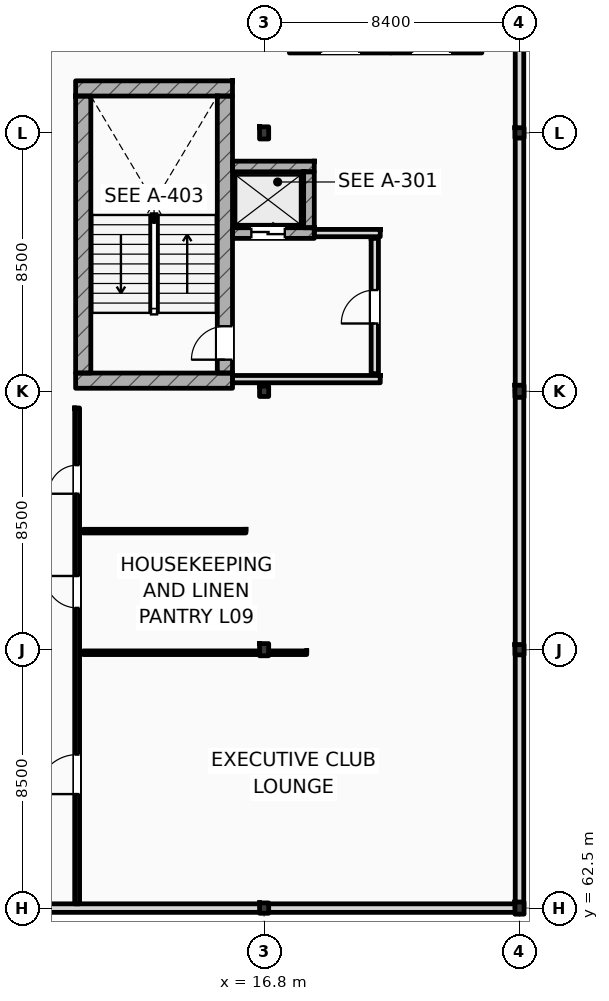
"""IFC4 building model, lengths in metres.
Left out: names, types, materials, properties, quantities, classifications, styles, units other than length and angle.
Written with IfcOpenShell. Run it as: python <this file> out.ifc"""

import sys

from ifc_helpers import new_model, si_unit, direction, frame, frame_2d, origin, origin_2d, place, context, subcontext, project, spatial, rectangle, i_section, extrude, element, fill, save


model = new_model("IFC4")
c1 = context("Model", 3, precision=1e-05, world=origin(), true_north=direction((0.0, 1.0)))
c2 = subcontext(c1, "Body", "Model", "MODEL_VIEW")
j1 = project(units=[si_unit("LENGTHUNIT", "METRE"), si_unit("PLANEANGLEUNIT", "RADIAN")], contexts=[c1])
p1 = place(None, origin())
s1 = spatial("IfcSite", under=j1, at=p1, CompositionType="ELEMENT")
p2 = place(p1, origin())
s2 = spatial("IfcBuilding", under=s1, at=p2, CompositionType="ELEMENT")
p3 = place(p2, frame((0.0, 0.0, 39.0)))
s3 = spatial("IfcBuildingStorey", under=s2, at=p3, CompositionType="ELEMENT", Elevation=39.0)
p4 = place(p3, frame((16.8, 62.5, 0.0), z_axis=(0.0, 0.0, 1.0), x_axis=(1.0, 0.0, 0.0)))
e1 = element("IfcColumn", 1, at=p4, inside=s3, PredefinedType="COLUMN", context=c2, shape_type="SweptSolid", body=[
    extrude(i_section(OverallWidth=0.3, OverallDepth=0.34, WebThickness=0.012, FlangeThickness=0.021, FilletRadius=0.027, at=origin_2d()), origin(), (0.0, 0.0, 1.0), 3.6),
])
p5 = place(p3, frame((16.8, 71.0, 0.0), z_axis=(0.0, 0.0, 1.0), x_axis=(1.0, 0.0, 0.0)))
e2 = element("IfcColumn", 2, at=p5, inside=s3, PredefinedType="COLUMN", context=c2, shape_type="SweptSolid", body=[
    extrude(i_section(OverallWidth=0.3, OverallDepth=0.4, WebThickness=0.013, FlangeThickness=0.024, FilletRadius=0.027, at=origin_2d()), origin(), (0.0, 0.0, 1.0), 3.6),
])
p6 = place(p3, frame((16.8, 79.5, 0.0), z_axis=(0.0, 0.0, 1.0), x_axis=(1.0, 0.0, 0.0)))
e3 = element("IfcColumn", 3, at=p6, inside=s3, PredefinedType="COLUMN", context=c2, shape_type="SweptSolid", body=[
    extrude(i_section(OverallWidth=0.3, OverallDepth=0.34, WebThickness=0.012, FlangeThickness=0.021, FilletRadius=0.027, at=origin_2d()), origin(), (0.0, 0.0, 1.0), 3.6),
])
for number, where, z_axis, x_axis in (
    (4, (16.8, 88.0, 0.0), (0.0, 0.0, 1.0), (1.0, 0.0, 0.0)),
    (5, (25.2, 62.5, 0.0), (0.0, 0.0, 1.0), (1.0, 0.0, 0.0)),
):
    element("IfcColumn", number, at=place(p3, frame(where, z_axis=z_axis, x_axis=x_axis)), inside=s3, PredefinedType="COLUMN", context=c2, shape_type="SweptSolid", body=[
        extrude(i_section(OverallWidth=0.3, OverallDepth=0.4, WebThickness=0.013, FlangeThickness=0.024, FilletRadius=0.027, at=origin_2d()), origin(), (0.0, 0.0, 1.0), 3.6),
    ])
p7 = place(p3, frame((25.2, 71.0, 0.0), z_axis=(0.0, 0.0, 1.0), x_axis=(1.0, 0.0, 0.0)))
e6 = element("IfcColumn", 6, at=p7, inside=s3, PredefinedType="COLUMN", context=c2, shape_type="SweptSolid", body=[
    extrude(i_section(OverallWidth=0.3, OverallDepth=0.34, WebThickness=0.012, FlangeThickness=0.021, FilletRadius=0.027, at=origin_2d()), origin(), (0.0, 0.0, 1.0), 3.6),
])
p8 = place(p3, frame((25.2, 79.5, 0.0), z_axis=(0.0, 0.0, 1.0), x_axis=(1.0, 0.0, 0.0)))
e7 = element("IfcColumn", 7, at=p8, inside=s3, PredefinedType="COLUMN", context=c2, shape_type="SweptSolid", body=[
    extrude(i_section(OverallWidth=0.3, OverallDepth=0.4, WebThickness=0.013, FlangeThickness=0.024, FilletRadius=0.027, at=origin_2d()), origin(), (0.0, 0.0, 1.0), 3.6),
])
p9 = place(p3, frame((25.2, 88.0, 0.0), z_axis=(0.0, 0.0, 1.0), x_axis=(1.0, 0.0, 0.0)))
e8 = element("IfcColumn", 8, at=p9, inside=s3, PredefinedType="COLUMN", context=c2, shape_type="SweptSolid", body=[
    extrude(i_section(OverallWidth=0.3, OverallDepth=0.34, WebThickness=0.012, FlangeThickness=0.021, FilletRadius=0.027, at=origin_2d()), origin(), (0.0, 0.0, 1.0), 3.6),
])
for number, where, z_axis, x_axis in (
    (9, (10.6, 89.462, 0.0), (0.0, 0.0, 1.0), (1.0, 0.0, 0.0)),
    (10, (10.6, 79.85, 0.0), (0.0, 0.0, 1.0), (1.0, 0.0, 0.0)),
):
    element("IfcWall", number, at=place(p3, frame(where, z_axis=z_axis, x_axis=x_axis)), inside=s3, PredefinedType="SHEAR", context=c2, shape_type="SweptSolid", body=[
        extrude(rectangle(XDim=5.16, YDim=0.5, at=frame_2d((2.58, 0.0))), origin(), (0.0, 0.0, 1.0), 3.6),
    ])
p10 = place(p3, frame((10.85, 80.1, 0.0), z_axis=(0.0, 0.0, 1.0), x_axis=(0.0, 1.0, 0.0)))
e11 = element("IfcWall", 11, at=p10, inside=s3, PredefinedType="SHEAR", context=c2, shape_type="SweptSolid", body=[
    extrude(rectangle(XDim=9.112, YDim=0.5, at=frame_2d((4.556, 0.0))), origin(), (0.0, 0.0, 1.0), 3.6),
])
p11 = place(p3, frame((15.51, 80.1, 0.0), z_axis=(0.0, 0.0, 1.0), x_axis=(0.0, 1.0, 0.0)))
e12 = element("IfcWall", 12, at=p11, inside=s3, PredefinedType="SHEAR", context=c2, shape_type="SweptSolid", body=[
    extrude(rectangle(XDim=9.112, YDim=0.5, at=frame_2d((4.556, 0.0))), origin(), (0.0, 0.0, 1.0), 3.6),
])
p12 = place(p11, frame((0.44, 0.0, 0.0)))
e13 = element("IfcOpeningElement", 13, at=p12, cuts=e12, PredefinedType="OPENING", context=c2, shape_type="SweptSolid", body=[
    extrude(rectangle(XDim=1.1, YDim=2.2, at=frame_2d((0.55, 1.1))), frame((0.0, 0.26, 0.0), z_axis=(0.0, -1.0, 0.0), x_axis=(1.0, 0.0, 0.0)), (0.0, 0.0, 1.0), 0.52),
])
p13 = place(p3, frame((0.0, 62.5, 0.0), z_axis=(0.0, 0.0, 1.0), x_axis=(1.0, 0.0, 0.0)))
e14 = element("IfcWall", 14, at=p13, inside=s3, PredefinedType="STANDARD", context=c2, shape_type="SweptSolid", body=[
    extrude(rectangle(XDim=25.2, YDim=0.28, at=frame_2d((12.6, 0.0))), origin(), (0.0, 0.0, 1.0), 2.72),
])
p14 = place(p3, frame((25.2, 62.5, 0.0), z_axis=(0.0, 0.0, 1.0), x_axis=(0.0, 1.0, 0.0)))
e15 = element("IfcWall", 15, at=p14, inside=s3, PredefinedType="STANDARD", context=c2, shape_type="SweptSolid", body=[
    extrude(rectangle(XDim=17.0, YDim=0.28, at=frame_2d((8.5, 0.0))), origin(), (0.0, 0.0, 1.0), 2.91),
])
p15 = place(p3, frame((25.2, 79.5, 0.0), z_axis=(0.0, 0.0, 1.0), x_axis=(0.0, 1.0, 0.0)))
e16 = element("IfcWall", 16, at=p15, inside=s3, PredefinedType="STANDARD", context=c2, shape_type="SweptSolid", body=[
    extrude(rectangle(XDim=16.5, YDim=0.28, at=frame_2d((8.25, 0.0))), origin(), (0.0, 0.0, 1.0), 3.01),
])
p16 = place(p3, frame((15.76, 86.895, 0.0), z_axis=(0.0, 0.0, 1.0), x_axis=(1.0, 0.0, 0.0)))
e17 = element("IfcWall", 17, at=p16, inside=s3, PredefinedType="SHEAR", context=c2, shape_type="SweptSolid", body=[
    extrude(rectangle(XDim=2.69, YDim=0.35, at=frame_2d((1.345, 0.0))), origin(), (0.0, 0.0, 1.0), 3.38),
])
p17 = place(p3, frame((15.76, 84.705, 0.0), z_axis=(0.0, 0.0, 1.0), x_axis=(1.0, 0.0, 0.0)))
e18 = element("IfcWall", 18, at=p17, inside=s3, PredefinedType="SHEAR", context=c2, shape_type="SweptSolid", body=[
    extrude(rectangle(XDim=2.69, YDim=0.35, at=frame_2d((1.345, 0.0))), origin(), (0.0, 0.0, 1.0), 3.38),
])
p18 = place(p17, frame((0.62, 0.0, 0.0)))
e19 = element("IfcOpeningElement", 19, at=p18, cuts=e18, PredefinedType="OPENING", context=c2, shape_type="SweptSolid", body=[
    extrude(rectangle(XDim=1.1, YDim=2.2, at=frame_2d((0.55, 1.1))), frame((0.0, 0.185, 0.0), z_axis=(0.0, -1.0, 0.0), x_axis=(1.0, 0.0, 0.0)), (0.0, 0.0, 1.0), 0.37),
])
p19 = place(p3, frame((18.275, 84.88, 0.0), z_axis=(0.0, 0.0, 1.0), x_axis=(0.0, 1.0, 0.0)))
e20 = element("IfcWall", 20, at=p19, inside=s3, PredefinedType="SHEAR", context=c2, shape_type="SweptSolid", body=[
    extrude(rectangle(XDim=1.84, YDim=0.35, at=frame_2d((0.92, 0.0))), origin(), (0.0, 0.0, 1.0), 3.38),
])
p20 = place(p3, frame((17.63, 90.805, 0.0), z_axis=(0.0, 0.0, 1.0), x_axis=(1.0, 0.0, 0.0)))
e21 = element("IfcWall", 21, at=p20, inside=s3, PredefinedType="SHEAR", context=c2, shape_type="SweptSolid", body=[
    extrude(rectangle(XDim=3.34, YDim=0.35, at=frame_2d((1.67, 0.0))), origin(), (0.0, 0.0, 1.0), 3.38),
])
p21 = place(p20, frame((1.045, 0.0, 0.0)))
e22 = element("IfcOpeningElement", 22, at=p21, cuts=e21, PredefinedType="OPENING", context=c2, shape_type="SweptSolid", body=[
    extrude(rectangle(XDim=1.25, YDim=2.25, at=frame_2d((0.625, 1.125))), frame((0.0, 0.185, 0.0), z_axis=(0.0, -1.0, 0.0), x_axis=(1.0, 0.0, 0.0)), (0.0, 0.0, 1.0), 0.37),
])
p22 = place(p3, frame((20.97, 90.805, 0.0), z_axis=(0.0, 0.0, 1.0), x_axis=(1.0, 0.0, 0.0)))
e23 = element("IfcWall", 23, at=p22, inside=s3, PredefinedType="SHEAR", context=c2, shape_type="SweptSolid", body=[
    extrude(rectangle(XDim=2.99, YDim=0.35, at=frame_2d((1.495, 0.0))), origin(), (0.0, 0.0, 1.0), 3.38),
])
p23 = place(p22, frame((0.695, 0.0, 0.0)))
e24 = element("IfcOpeningElement", 24, at=p23, cuts=e23, PredefinedType="OPENING", context=c2, shape_type="SweptSolid", body=[
    extrude(rectangle(XDim=1.25, YDim=2.25, at=frame_2d((0.625, 1.125))), frame((0.0, 0.185, 0.0), z_axis=(0.0, -1.0, 0.0), x_axis=(1.0, 0.0, 0.0)), (0.0, 0.0, 1.0), 0.37),
])
p24 = place(p3, frame((15.76, 79.9, 0.0), z_axis=(0.0, 0.0, 1.0), x_axis=(1.0, 0.0, 0.0)))
e25 = element("IfcWall", 25, at=p24, inside=s3, PredefinedType="STANDARD", context=c2, shape_type="SweptSolid", body=[
    extrude(rectangle(XDim=4.86, YDim=0.24, at=frame_2d((2.43, 0.0))), origin(), (0.0, 0.0, 1.0), 3.38),
])
p25 = place(p3, frame((18.45, 84.705, 0.0), z_axis=(0.0, 0.0, 1.0), x_axis=(1.0, 0.0, 0.0)))
e26 = element("IfcWall", 26, at=p25, inside=s3, PredefinedType="STANDARD", context=c2, shape_type="SweptSolid", body=[
    extrude(rectangle(XDim=2.17, YDim=0.24, at=frame_2d((1.085, 0.0))), origin(), (0.0, 0.0, 1.0), 3.38),
])
p26 = place(p3, frame((20.44, 80.08, 0.0), z_axis=(0.0, 0.0, 1.0), x_axis=(0.0, 1.0, 0.0)))
e27 = element("IfcWall", 27, at=p26, inside=s3, PredefinedType="STANDARD", context=c2, shape_type="SweptSolid", body=[
    extrude(rectangle(XDim=4.45, YDim=0.24, at=frame_2d((2.225, 0.0))), origin(), (0.0, 0.0, 1.0), 3.38),
])
p27 = place(p26, frame((1.65, 0.0, 0.0)))
e28 = element("IfcOpeningElement", 28, at=p27, cuts=e27, PredefinedType="OPENING", context=c2, shape_type="SweptSolid", body=[
    extrude(rectangle(XDim=1.1, YDim=2.2, at=frame_2d((0.55, 1.1))), frame((0.0, 0.13, 0.0), z_axis=(0.0, -1.0, 0.0), x_axis=(1.0, 0.0, 0.0)), (0.0, 0.0, 1.0), 0.26),
])
p28 = place(p3, frame((10.65, 62.64, 0.0), z_axis=(0.0, 0.0, 1.0), x_axis=(0.0, 1.0, 0.0)))
e29 = element("IfcWall", 29, at=p28, inside=s3, PredefinedType="PARTITIONING", context=c2, shape_type="SweptSolid", body=[
    extrude(rectangle(XDim=16.31, YDim=0.16, at=frame_2d((8.155, 0.0))), origin(), (0.0, 0.0, 1.0), 3.38),
])
p29 = place(p28, frame((3.61, 0.0, 0.0)))
e30 = element("IfcOpeningElement", 30, at=p29, cuts=e29, PredefinedType="OPENING", context=c2, shape_type="SweptSolid", body=[
    extrude(rectangle(XDim=1.3, YDim=2.2, at=frame_2d((0.65, 1.1))), frame((0.0, 0.09, 0.0), z_axis=(0.0, -1.0, 0.0), x_axis=(1.0, 0.0, 0.0)), (0.0, 0.0, 1.0), 0.18),
])
p30 = place(p28, frame((9.735, 0.0, 0.0)))
e31 = element("IfcOpeningElement", 31, at=p30, cuts=e29, PredefinedType="OPENING", context=c2, shape_type="SweptSolid", body=[
    extrude(rectangle(XDim=1.05, YDim=2.12, at=frame_2d((0.525, 1.06))), frame((0.0, 0.09, 0.0), z_axis=(0.0, -1.0, 0.0), x_axis=(1.0, 0.0, 0.0)), (0.0, 0.0, 1.0), 0.18),
])
p31 = place(p28, frame((13.49, 0.0, 0.0)))
e32 = element("IfcOpeningElement", 32, at=p31, cuts=e29, PredefinedType="OPENING", context=c2, shape_type="SweptSolid", body=[
    extrude(rectangle(XDim=0.94, YDim=2.15, at=frame_2d((0.47, 1.075))), frame((0.0, 0.09, 0.0), z_axis=(0.0, -1.0, 0.0), x_axis=(1.0, 0.0, 0.0)), (0.0, 0.0, 1.0), 0.18),
])
p32 = place(p3, frame((10.85, 70.9, 0.0), z_axis=(0.0, 0.0, 1.0), x_axis=(1.0, 0.0, 0.0)))
e33 = element("IfcWall", 33, at=p32, inside=s3, PredefinedType="PARTITIONING", context=c2, shape_type="SweptSolid", body=[
    extrude(rectangle(XDim=7.35, YDim=0.12, at=frame_2d((3.675, 0.0))), origin(), (0.0, 0.0, 1.0), 2.72),
])
p33 = place(p3, frame((10.85, 74.9, 0.0), z_axis=(0.0, 0.0, 1.0), x_axis=(1.0, 0.0, 0.0)))
e34 = element("IfcWall", 34, at=p33, inside=s3, PredefinedType="PARTITIONING", context=c2, shape_type="SweptSolid", body=[
    extrude(rectangle(XDim=5.35, YDim=0.12, at=frame_2d((2.675, 0.0))), origin(), (0.0, 0.0, 1.0), 3.38),
])
p34 = place(p12, origin())
e35 = element("IfcDoor", 35, at=p34, inside=s3, OperationType="SINGLE_SWING_LEFT", PredefinedType="DOOR", context=c2, shape_type="SweptSolid", body=[
    extrude(rectangle(XDim=1.1, YDim=2.2, at=frame_2d((0.55, 1.1))), frame((0.0, 0.025, 0.0), z_axis=(0.0, -1.0, 0.0), x_axis=(1.0, 0.0, 0.0)), (0.0, 0.0, 1.0), 0.05),
])
fill(e13, e35)
p35 = place(p18, origin())
e36 = element("IfcDoor", 36, at=p35, inside=s3, OperationType="SLIDING_TO_LEFT", PredefinedType="DOOR", context=c2, shape_type="SweptSolid", body=[
    extrude(rectangle(XDim=1.1, YDim=2.2, at=frame_2d((0.55, 1.1))), frame((0.0, 0.025, 0.0), z_axis=(0.0, -1.0, 0.0), x_axis=(1.0, 0.0, 0.0)), (0.0, 0.0, 1.0), 0.05),
])
fill(e19, e36)
p36 = place(p27, origin())
e37 = element("IfcDoor", 37, at=p36, inside=s3, OperationType="SINGLE_SWING_LEFT", PredefinedType="DOOR", context=c2, shape_type="SweptSolid", body=[
    extrude(rectangle(XDim=1.1, YDim=2.2, at=frame_2d((0.55, 1.1))), frame((0.0, 0.025, 0.0), z_axis=(0.0, -1.0, 0.0), x_axis=(1.0, 0.0, 0.0)), (0.0, 0.0, 1.0), 0.05),
])
fill(e28, e37)
p37 = place(p29, origin())
e38 = element("IfcDoor", 38, at=p37, inside=s3, OperationType="SINGLE_SWING_LEFT", PredefinedType="DOOR", context=c2, shape_type="SweptSolid", body=[
    extrude(rectangle(XDim=1.3, YDim=2.2, at=frame_2d((0.65, 1.1))), frame((0.0, 0.025, 0.0), z_axis=(0.0, -1.0, 0.0), x_axis=(1.0, 0.0, 0.0)), (0.0, 0.0, 1.0), 0.05),
])
fill(e30, e38)
p38 = place(p30, origin())
e39 = element("IfcDoor", 39, at=p38, inside=s3, OperationType="SINGLE_SWING_RIGHT", PredefinedType="DOOR", context=c2, shape_type="SweptSolid", body=[
    extrude(rectangle(XDim=1.05, YDim=2.12, at=frame_2d((0.525, 1.06))), frame((0.0, 0.025, 0.0), z_axis=(0.0, -1.0, 0.0), x_axis=(1.0, 0.0, 0.0)), (0.0, 0.0, 1.0), 0.05),
])
fill(e31, e39)
p39 = place(p31, origin())
e40 = element("IfcDoor", 40, at=p39, inside=s3, OperationType="SINGLE_SWING_LEFT", PredefinedType="DOOR", context=c2, shape_type="SweptSolid", body=[
    extrude(rectangle(XDim=0.94, YDim=2.15, at=frame_2d((0.47, 1.075))), frame((0.0, 0.025, 0.0), z_axis=(0.0, -1.0, 0.0), x_axis=(1.0, 0.0, 0.0)), (0.0, 0.0, 1.0), 0.05),
])
fill(e32, e40)
save(model, sys.argv[1])
